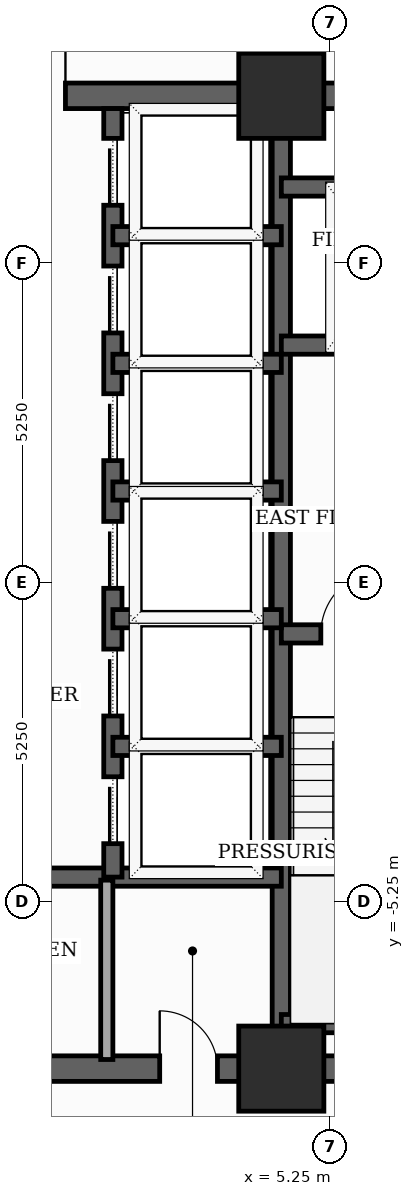
"""IFC4 building model, lengths in metres.
Left out: names, types, materials, properties, quantities, classifications, styles, units other than length and angle.
Written with IfcOpenShell. Run it as: python <this file> out.ifc"""

import sys

from ifc_helpers import new_model, si_unit, direction, frame, frame_2d, origin, origin_2d, place, context, subcontext, project, spatial, rectangle, extrude, element, fill, save


model = new_model("IFC4")
c1 = context("Model", 3, precision=1e-05, world=origin(), true_north=direction((0.0, 1.0)))
c2 = subcontext(c1, "Body", "Model", "MODEL_VIEW")
j1 = project(units=[si_unit("LENGTHUNIT", "METRE"), si_unit("PLANEANGLEUNIT", "RADIAN")], contexts=[c1])
p1 = place(None, origin())
s1 = spatial("IfcSite", under=j1, at=p1, CompositionType="ELEMENT")
p2 = place(p1, origin())
s2 = spatial("IfcBuilding", under=s1, at=p2, CompositionType="ELEMENT")
p3 = place(p2, frame((0.0, 0.0, 108.8)))
s3 = spatial("IfcBuildingStorey", under=s2, at=p3, CompositionType="ELEMENT", Elevation=108.8)
for number, where, z_axis, x_axis in (
    (1, (4.45, -8.0, 0.0), (0.0, 0.0, 1.0), (1.0, 0.0, 0.0)),
    (2, (4.45, 8.0, 0.0), (0.0, 0.0, 1.0), (1.0, 0.0, 0.0)),
):
    element("IfcColumn", number, at=place(p3, frame(where, z_axis=z_axis, x_axis=x_axis)), inside=s3, PredefinedType="COLUMN", context=c2, shape_type="SweptSolid", body=[
        extrude(rectangle(XDim=1.4, YDim=1.4, at=origin_2d()), origin(), (0.0, 0.0, 1.0), 3.7),
    ])
p4 = place(p3, frame((-8.0, -8.0, 0.0), z_axis=(0.0, 0.0, 1.0), x_axis=(1.0, 0.0, 0.0)))
e3 = element("IfcWall", 3, at=p4, inside=s3, PredefinedType="SHEAR", context=c2, shape_type="SweptSolid", body=[
    extrude(rectangle(XDim=16.0, YDim=0.42, at=frame_2d((8.0, 0.0))), origin(), (0.0, 0.0, 1.0), 3.5),
])
p5 = place(p4, frame((4.6, 0.0, 0.0)))
e4 = element("IfcOpeningElement", 4, at=p5, cuts=e3, PredefinedType="OPENING", context=c2, shape_type="SweptSolid", body=[
    extrude(rectangle(XDim=0.95, YDim=2.1, at=frame_2d((0.475, 1.05))), frame((0.0, 0.22, 0.0), z_axis=(0.0, -1.0, 0.0), x_axis=(1.0, 0.0, 0.0)), (0.0, 0.0, 1.0), 0.44),
])
p6 = place(p4, frame((7.52, 0.0, 0.0)))
e5 = element("IfcOpeningElement", 5, at=p6, cuts=e3, PredefinedType="OPENING", context=c2, shape_type="SweptSolid", body=[
    extrude(rectangle(XDim=0.95, YDim=2.1, at=frame_2d((0.475, 1.05))), frame((0.0, 0.22, 0.0), z_axis=(0.0, -1.0, 0.0), x_axis=(1.0, 0.0, 0.0)), (0.0, 0.0, 1.0), 0.44),
])
p7 = place(p4, frame((10.45, 0.0, 0.0)))
e6 = element("IfcOpeningElement", 6, at=p7, cuts=e3, PredefinedType="OPENING", context=c2, shape_type="SweptSolid", body=[
    extrude(rectangle(XDim=0.95, YDim=2.1, at=frame_2d((0.475, 1.05))), frame((0.0, 0.22, 0.0), z_axis=(0.0, -1.0, 0.0), x_axis=(1.0, 0.0, 0.0)), (0.0, 0.0, 1.0), 0.44),
])
p8 = place(p3, frame((-8.0, 8.0, 0.0), z_axis=(0.0, 0.0, 1.0), x_axis=(1.0, 0.0, 0.0)))
e7 = element("IfcWall", 7, at=p8, inside=s3, PredefinedType="SHEAR", context=c2, shape_type="SweptSolid", body=[
    extrude(rectangle(XDim=16.0, YDim=0.42, at=frame_2d((8.0, 0.0))), origin(), (0.0, 0.0, 1.0), 3.5),
])
p9 = place(p8, frame((7.1, 0.0, 0.0)))
e8 = element("IfcOpeningElement", 8, at=p9, cuts=e7, PredefinedType="OPENING", context=c2, shape_type="SweptSolid", body=[
    extrude(rectangle(XDim=1.8, YDim=2.15, at=frame_2d((0.9, 1.075))), frame((0.0, 0.22, 0.0), z_axis=(0.0, -1.0, 0.0), x_axis=(1.0, 0.0, 0.0)), (0.0, 0.0, 1.0), 0.44),
])
p10 = place(p3, frame((4.45, -7.79, 0.0), z_axis=(0.0, 0.0, 1.0), x_axis=(0.0, 1.0, 0.0)))
e9 = element("IfcWall", 9, at=p10, inside=s3, PredefinedType="SHEAR", context=c2, shape_type="SweptSolid", body=[
    extrude(rectangle(XDim=15.58, YDim=0.3, at=frame_2d((7.79, 0.0))), origin(), (0.0, 0.0, 1.0), 3.5),
])
p11 = place(p3, frame((4.45, -0.85, 0.0), z_axis=(0.0, 0.0, 1.0), x_axis=(1.0, 0.0, 0.0)))
e10 = element("IfcWall", 10, at=p11, inside=s3, PredefinedType="SHEAR", context=c2, shape_type="SweptSolid", body=[
    extrude(rectangle(XDim=3.34, YDim=0.3, at=frame_2d((1.67, 0.0))), origin(), (0.0, 0.0, 1.0), 3.5),
])
p12 = place(p11, frame((0.65, 0.0, 0.0)))
e11 = element("IfcOpeningElement", 11, at=p12, cuts=e10, PredefinedType="OPENING", context=c2, shape_type="SweptSolid", body=[
    extrude(rectangle(XDim=1.05, YDim=2.15, at=frame_2d((0.525, 1.075))), frame((0.0, 0.16, 0.0), z_axis=(0.0, -1.0, 0.0), x_axis=(1.0, 0.0, 0.0)), (0.0, 0.0, 1.0), 0.32),
])
p13 = place(p3, frame((4.45, -7.26, 0.0), z_axis=(0.0, 0.0, 1.0), x_axis=(1.0, 0.0, 0.0)))
e12 = element("IfcWall", 12, at=p13, inside=s3, PredefinedType="SHEAR", context=c2, shape_type="SweptSolid", body=[
    extrude(rectangle(XDim=3.55, YDim=0.3, at=frame_2d((1.775, 0.0))), origin(), (0.0, 0.0, 1.0), 3.5),
])
p14 = place(p3, frame((4.45, 3.9, 0.0), z_axis=(0.0, 0.0, 1.0), x_axis=(1.0, 0.0, 0.0)))
e13 = element("IfcWall", 13, at=p14, inside=s3, PredefinedType="SHEAR", context=c2, shape_type="SweptSolid", body=[
    extrude(rectangle(XDim=3.34, YDim=0.3, at=frame_2d((1.67, 0.0))), origin(), (0.0, 0.0, 1.0), 3.5),
])
p15 = place(p14, frame((1.18, 0.0, 0.0)))
e14 = element("IfcOpeningElement", 14, at=p15, cuts=e13, PredefinedType="OPENING", context=c2, shape_type="SweptSolid", body=[
    extrude(rectangle(XDim=1.1, YDim=2.1, at=frame_2d((0.55, 1.05))), frame((0.0, 0.16, 0.0), z_axis=(0.0, -1.0, 0.0), x_axis=(1.0, 0.0, 0.0)), (0.0, 0.0, 1.0), 0.32),
])
p16 = place(p3, frame((4.45, 6.5, 0.0), z_axis=(0.0, 0.0, 1.0), x_axis=(1.0, 0.0, 0.0)))
e15 = element("IfcWall", 15, at=p16, inside=s3, PredefinedType="SHEAR", context=c2, shape_type="SweptSolid", body=[
    extrude(rectangle(XDim=3.34, YDim=0.3, at=frame_2d((1.67, 0.0))), origin(), (0.0, 0.0, 1.0), 3.5),
])
p17 = place(p3, frame((-4.45, -4.85, 0.0), z_axis=(0.0, 0.0, 1.0), x_axis=(1.0, 0.0, 0.0)))
e16 = element("IfcWall", 16, at=p17, inside=s3, PredefinedType="SHEAR", context=c2, shape_type="SweptSolid", body=[
    extrude(rectangle(XDim=8.9, YDim=0.3, at=frame_2d((4.45, 0.0))), origin(), (0.0, 0.0, 1.0), 3.5),
])
p18 = place(p3, frame((1.68, -4.85, 0.0), z_axis=(0.0, 0.0, 1.0), x_axis=(0.0, 1.0, 0.0)))
e17 = element("IfcWall", 17, at=p18, inside=s3, PredefinedType="SHEAR", context=c2, shape_type="SweptSolid", body=[
    extrude(rectangle(XDim=12.64, YDim=0.3, at=frame_2d((6.32, 0.0))), origin(), (0.0, 0.0, 1.0), 3.5),
])
p19 = place(p18, frame((0.55, 0.0, 0.0)))
e18 = element("IfcOpeningElement", 18, at=p19, cuts=e17, PredefinedType="OPENING", context=c2, shape_type="SweptSolid", body=[
    extrude(rectangle(XDim=1.1, YDim=2.1, at=frame_2d((0.55, 1.05))), frame((0.0, 0.16, 0.0), z_axis=(0.0, -1.0, 0.0), x_axis=(1.0, 0.0, 0.0)), (0.0, 0.0, 1.0), 0.32),
])
p20 = place(p18, frame((2.65, 0.0, 0.0)))
e19 = element("IfcOpeningElement", 19, at=p20, cuts=e17, PredefinedType="OPENING", context=c2, shape_type="SweptSolid", body=[
    extrude(rectangle(XDim=1.1, YDim=2.1, at=frame_2d((0.55, 1.05))), frame((0.0, 0.16, 0.0), z_axis=(0.0, -1.0, 0.0), x_axis=(1.0, 0.0, 0.0)), (0.0, 0.0, 1.0), 0.32),
])
p21 = place(p18, frame((4.75, 0.0, 0.0)))
e20 = element("IfcOpeningElement", 20, at=p21, cuts=e17, PredefinedType="OPENING", context=c2, shape_type="SweptSolid", body=[
    extrude(rectangle(XDim=1.1, YDim=2.1, at=frame_2d((0.55, 1.05))), frame((0.0, 0.16, 0.0), z_axis=(0.0, -1.0, 0.0), x_axis=(1.0, 0.0, 0.0)), (0.0, 0.0, 1.0), 0.32),
])
p22 = place(p18, frame((6.85, 0.0, 0.0)))
e21 = element("IfcOpeningElement", 21, at=p22, cuts=e17, PredefinedType="OPENING", context=c2, shape_type="SweptSolid", body=[
    extrude(rectangle(XDim=1.1, YDim=2.1, at=frame_2d((0.55, 1.05))), frame((0.0, 0.16, 0.0), z_axis=(0.0, -1.0, 0.0), x_axis=(1.0, 0.0, 0.0)), (0.0, 0.0, 1.0), 0.32),
])
p23 = place(p18, frame((8.95, 0.0, 0.0)))
e22 = element("IfcOpeningElement", 22, at=p23, cuts=e17, PredefinedType="OPENING", context=c2, shape_type="SweptSolid", body=[
    extrude(rectangle(XDim=1.1, YDim=2.1, at=frame_2d((0.55, 1.05))), frame((0.0, 0.16, 0.0), z_axis=(0.0, -1.0, 0.0), x_axis=(1.0, 0.0, 0.0)), (0.0, 0.0, 1.0), 0.32),
])
p24 = place(p18, frame((11.05, 0.0, 0.0)))
e23 = element("IfcOpeningElement", 23, at=p24, cuts=e17, PredefinedType="OPENING", context=c2, shape_type="SweptSolid", body=[
    extrude(rectangle(XDim=1.1, YDim=2.1, at=frame_2d((0.55, 1.05))), frame((0.0, 0.16, 0.0), z_axis=(0.0, -1.0, 0.0), x_axis=(1.0, 0.0, 0.0)), (0.0, 0.0, 1.0), 0.32),
])
for number, where, z_axis, x_axis in (
    (24, (1.68, 1.5, 0.0), (0.0, 0.0, 1.0), (1.0, 0.0, 0.0)),
    (25, (1.68, 3.6, 0.0), (0.0, 0.0, 1.0), (1.0, 0.0, 0.0)),
    (26, (1.68, 5.7, 0.0), (0.0, 0.0, 1.0), (1.0, 0.0, 0.0)),
    (27, (1.68, -2.7, 0.0), (0.0, 0.0, 1.0), (1.0, 0.0, 0.0)),
    (28, (1.68, -0.6, 0.0), (0.0, 0.0, 1.0), (1.0, 0.0, 0.0)),
):
    element("IfcWall", number, at=place(p3, frame(where, z_axis=z_axis, x_axis=x_axis)), inside=s3, PredefinedType="SHEAR", context=c2, shape_type="SweptSolid", body=[
        extrude(rectangle(XDim=2.77, YDim=0.3, at=frame_2d((1.385, 0.0))), origin(), (0.0, 0.0, 1.0), 3.5),
    ])
p25 = place(p3, frame((1.58, -7.85, 0.0), z_axis=(0.0, 0.0, 1.0), x_axis=(0.0, 1.0, 0.0)))
e29 = element("IfcWall", 29, at=p25, inside=s3, PredefinedType="SOLIDWALL", context=c2, shape_type="SweptSolid", body=[
    extrude(rectangle(XDim=2.95, YDim=0.2, at=frame_2d((1.475, 0.0))), origin(), (0.0, 0.0, 1.0), 2.885),
])
p26 = place(p7, origin())
e30 = element("IfcDoor", 30, at=p26, inside=s3, OperationType="SINGLE_SWING_LEFT", PredefinedType="DOOR", context=c2, shape_type="SweptSolid", body=[
    extrude(rectangle(XDim=0.95, YDim=2.1, at=frame_2d((0.475, 1.05))), frame((0.0, 0.025, 0.0), z_axis=(0.0, -1.0, 0.0), x_axis=(1.0, 0.0, 0.0)), (0.0, 0.0, 1.0), 0.05),
])
fill(e6, e30)
p27 = place(p9, origin())
e31 = element("IfcDoor", 31, at=p27, inside=s3, OperationType="DOUBLE_DOOR_SINGLE_SWING", PredefinedType="DOOR", context=c2, shape_type="SweptSolid", body=[
    extrude(rectangle(XDim=1.8, YDim=2.15, at=frame_2d((0.9, 1.075))), frame((0.0, 0.025, 0.0), z_axis=(0.0, -1.0, 0.0), x_axis=(1.0, 0.0, 0.0)), (0.0, 0.0, 1.0), 0.05),
])
fill(e8, e31)
p28 = place(p12, origin())
e32 = element("IfcDoor", 32, at=p28, inside=s3, OperationType="SINGLE_SWING_RIGHT", PredefinedType="DOOR", context=c2, shape_type="SweptSolid", body=[
    extrude(rectangle(XDim=1.05, YDim=2.15, at=frame_2d((0.525, 1.075))), frame((0.0, 0.025, 0.0), z_axis=(0.0, -1.0, 0.0), x_axis=(1.0, 0.0, 0.0)), (0.0, 0.0, 1.0), 0.05),
])
fill(e11, e32)
p29 = place(p19, origin())
e33 = element("IfcDoor", 33, at=p29, inside=s3, OperationType="SLIDING_TO_LEFT", PredefinedType="DOOR", context=c2, shape_type="SweptSolid", body=[
    extrude(rectangle(XDim=1.1, YDim=2.1, at=frame_2d((0.55, 1.05))), frame((0.0, 0.025, 0.0), z_axis=(0.0, -1.0, 0.0), x_axis=(1.0, 0.0, 0.0)), (0.0, 0.0, 1.0), 0.05),
])
fill(e18, e33)
p30 = place(p20, origin())
e34 = element("IfcDoor", 34, at=p30, inside=s3, OperationType="SLIDING_TO_LEFT", PredefinedType="DOOR", context=c2, shape_type="SweptSolid", body=[
    extrude(rectangle(XDim=1.1, YDim=2.1, at=frame_2d((0.55, 1.05))), frame((0.0, 0.025, 0.0), z_axis=(0.0, -1.0, 0.0), x_axis=(1.0, 0.0, 0.0)), (0.0, 0.0, 1.0), 0.05),
])
fill(e19, e34)
p31 = place(p21, origin())
e35 = element("IfcDoor", 35, at=p31, inside=s3, OperationType="SLIDING_TO_LEFT", PredefinedType="DOOR", context=c2, shape_type="SweptSolid", body=[
    extrude(rectangle(XDim=1.1, YDim=2.1, at=frame_2d((0.55, 1.05))), frame((0.0, 0.025, 0.0), z_axis=(0.0, -1.0, 0.0), x_axis=(1.0, 0.0, 0.0)), (0.0, 0.0, 1.0), 0.05),
])
fill(e20, e35)
p32 = place(p22, origin())
e36 = element("IfcDoor", 36, at=p32, inside=s3, OperationType="SLIDING_TO_LEFT", PredefinedType="DOOR", context=c2, shape_type="SweptSolid", body=[
    extrude(rectangle(XDim=1.1, YDim=2.1, at=frame_2d((0.55, 1.05))), frame((0.0, 0.025, 0.0), z_axis=(0.0, -1.0, 0.0), x_axis=(1.0, 0.0, 0.0)), (0.0, 0.0, 1.0), 0.05),
])
fill(e21, e36)
p33 = place(p23, origin())
e37 = element("IfcDoor", 37, at=p33, inside=s3, OperationType="SLIDING_TO_LEFT", PredefinedType="DOOR", context=c2, shape_type="SweptSolid", body=[
    extrude(rectangle(XDim=1.1, YDim=2.1, at=frame_2d((0.55, 1.05))), frame((0.0, 0.025, 0.0), z_axis=(0.0, -1.0, 0.0), x_axis=(1.0, 0.0, 0.0)), (0.0, 0.0, 1.0), 0.05),
])
fill(e22, e37)
p34 = place(p24, origin())
e38 = element("IfcDoor", 38, at=p34, inside=s3, OperationType="SLIDING_TO_LEFT", PredefinedType="DOOR", context=c2, shape_type="SweptSolid", body=[
    extrude(rectangle(XDim=1.1, YDim=2.1, at=frame_2d((0.55, 1.05))), frame((0.0, 0.025, 0.0), z_axis=(0.0, -1.0, 0.0), x_axis=(1.0, 0.0, 0.0)), (0.0, 0.0, 1.0), 0.05),
])
fill(e23, e38)
save(model, sys.argv[1])
